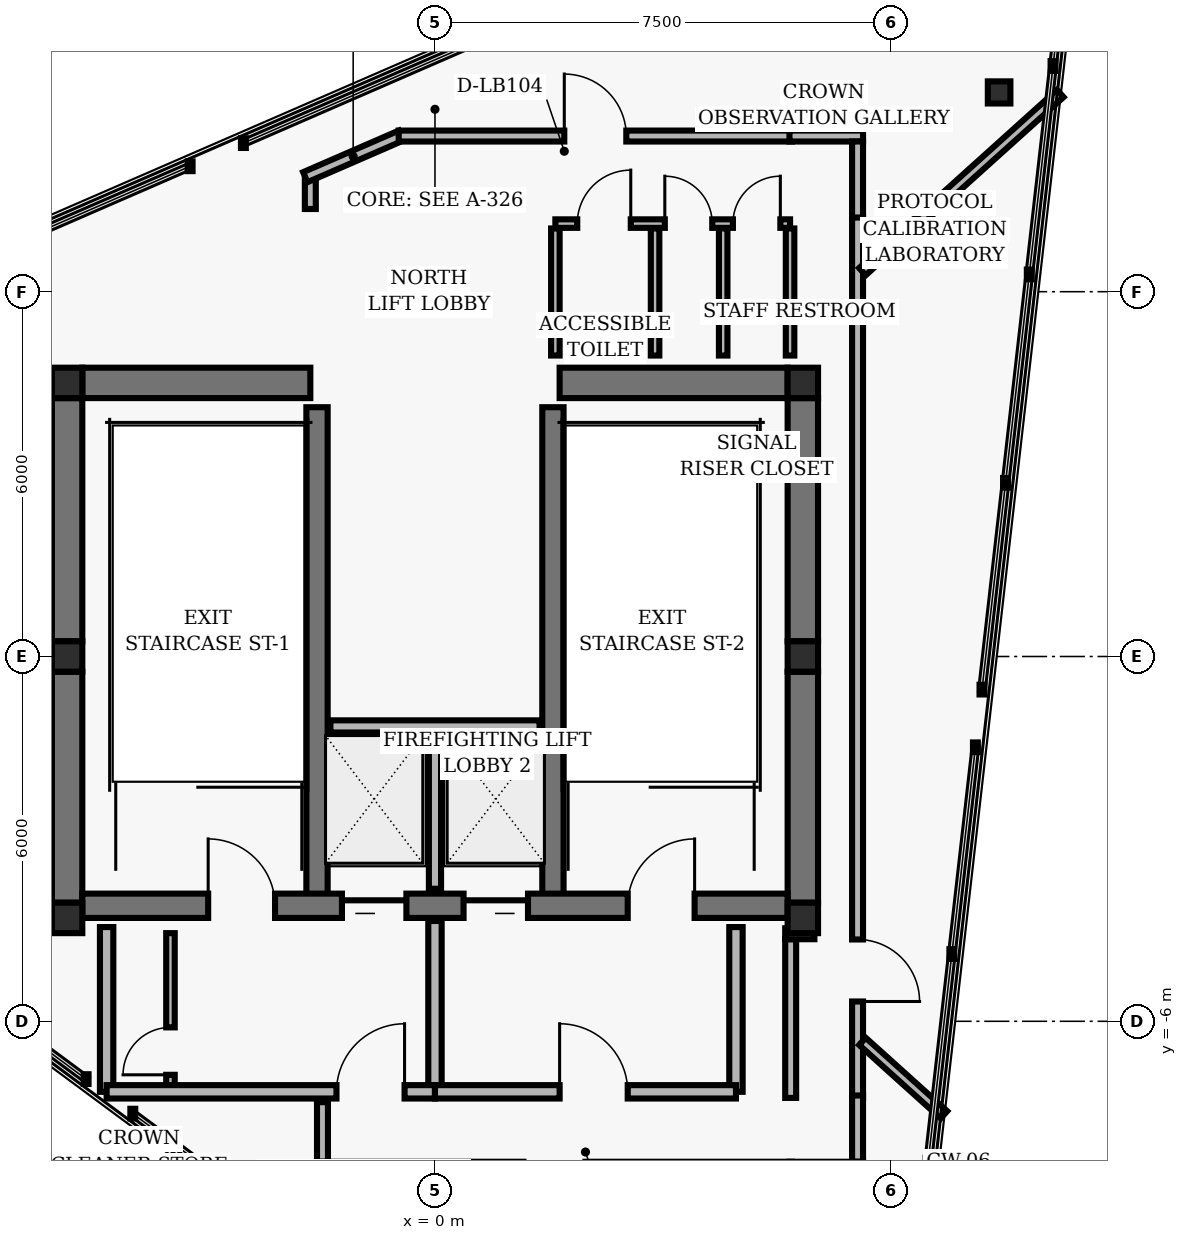
"""IFC4 building model, lengths in metres.
Left out: names, types, materials, properties, quantities, classifications, styles, units other than length and angle.
Written with IfcOpenShell. Run it as: python <this file> out.ifc"""

import sys

from ifc_helpers import new_model, si_unit, direction, frame, frame_2d, origin, origin_2d, place, context, subcontext, project, spatial, rectangle, hollow_rectangle, i_section, extrude, element, fill, save


model = new_model("IFC4")
c1 = context("Model", 3, precision=1e-05, world=origin(), true_north=direction((0.0, 1.0)))
c2 = subcontext(c1, "Body", "Model", "MODEL_VIEW")
j1 = project(units=[si_unit("LENGTHUNIT", "METRE"), si_unit("PLANEANGLEUNIT", "RADIAN")], contexts=[c1])
p1 = place(None, origin())
s1 = spatial("IfcSite", under=j1, at=p1, CompositionType="ELEMENT")
p2 = place(p1, origin())
s2 = spatial("IfcBuilding", under=s1, at=p2, CompositionType="ELEMENT")
p3 = place(p2, frame((0.0, 0.0, 254.88)))
s3 = spatial("IfcBuildingStorey", under=s2, at=p3, CompositionType="ELEMENT", Elevation=254.88)
for number, where, z_axis, x_axis in (
    (1, (-6.05, 4.5, 0.0), (0.0, 0.0, 1.0), (1.0, 0.0, 0.0)),
    (2, (6.05, 4.5, 0.0), (0.0, 0.0, 1.0), (1.0, 0.0, 0.0)),
    (3, (-6.05, 0.0, 0.0), (0.0, 0.0, 1.0), (1.0, 0.0, 0.0)),
    (4, (6.05, 0.0, 0.0), (0.0, 0.0, 1.0), (1.0, 0.0, 0.0)),
    (5, (-6.05, -4.3, 0.0), (0.0, 0.0, 1.0), (1.0, 0.0, 0.0)),
    (6, (6.05, -4.3, 0.0), (0.0, 0.0, 1.0), (1.0, 0.0, 0.0)),
):
    element("IfcColumn", number, at=place(p3, frame(where, z_axis=z_axis, x_axis=x_axis)), inside=s3, PredefinedType="COLUMN", context=c2, shape_type="SweptSolid", body=[
        extrude(hollow_rectangle(XDim=0.5, YDim=0.5, WallThickness=0.02, InnerFilletRadius=0.02, OuterFilletRadius=0.04, at=origin_2d()), origin(), (0.0, 0.0, 1.0), 2.88),
    ])
p4 = place(p3, frame((-6.05, 0.25, 0.0), z_axis=(0.0, 0.0, 1.0), x_axis=(0.0, 1.0, 0.0)))
e7 = element("IfcWall", 7, at=p4, inside=s3, PredefinedType="SHEAR", context=c2, shape_type="SweptSolid", body=[
    extrude(rectangle(XDim=4.0, YDim=0.5, at=frame_2d((2.0, 0.0))), origin(), (0.0, 0.0, 1.0), 2.458),
])
p5 = place(p3, frame((-6.05, -4.05, 0.0), z_axis=(0.0, 0.0, 1.0), x_axis=(0.0, 1.0, 0.0)))
e8 = element("IfcWall", 8, at=p5, inside=s3, PredefinedType="SHEAR", context=c2, shape_type="SweptSolid", body=[
    extrude(rectangle(XDim=3.8, YDim=0.5, at=frame_2d((1.9, 0.0))), origin(), (0.0, 0.0, 1.0), 2.458),
])
p6 = place(p3, frame((6.05, 0.25, 0.0), z_axis=(0.0, 0.0, 1.0), x_axis=(0.0, 1.0, 0.0)))
e9 = element("IfcWall", 9, at=p6, inside=s3, PredefinedType="SHEAR", context=c2, shape_type="SweptSolid", body=[
    extrude(rectangle(XDim=4.0, YDim=0.5, at=frame_2d((2.0, 0.0))), origin(), (0.0, 0.0, 1.0), 2.458),
])
p7 = place(p3, frame((6.05, -4.05, 0.0), z_axis=(0.0, 0.0, 1.0), x_axis=(0.0, 1.0, 0.0)))
e10 = element("IfcWall", 10, at=p7, inside=s3, PredefinedType="SHEAR", context=c2, shape_type="SweptSolid", body=[
    extrude(rectangle(XDim=3.8, YDim=0.5, at=frame_2d((1.9, 0.0))), origin(), (0.0, 0.0, 1.0), 2.458),
])
for number, where, z_axis, x_axis in (
    (11, (-1.94, -4.1, 0.0), (0.0, 0.0, 1.0), (0.0, 1.0, 0.0)),
    (12, (1.94, -4.1, 0.0), (0.0, 0.0, 1.0), (0.0, 1.0, 0.0)),
):
    element("IfcWall", number, at=place(p3, frame(where, z_axis=z_axis, x_axis=x_axis)), inside=s3, PredefinedType="SHEAR", context=c2, shape_type="SweptSolid", body=[
        extrude(rectangle(XDim=8.2, YDim=0.35, at=frame_2d((4.1, 0.0))), origin(), (0.0, 0.0, 1.0), 2.458),
    ])
p8 = place(p3, frame((-5.8, -4.1, 0.0), z_axis=(0.0, 0.0, 1.0), x_axis=(1.0, 0.0, 0.0)))
e13 = element("IfcWall", 13, at=p8, inside=s3, PredefinedType="SHEAR", context=c2, shape_type="SweptSolid", body=[
    extrude(rectangle(XDim=11.6, YDim=0.4, at=frame_2d((5.8, 0.0))), origin(), (0.0, 0.0, 1.0), 2.458),
])
p9 = place(p8, frame((2.07, 0.0, 0.0)))
e14 = element("IfcOpeningElement", 14, at=p9, cuts=e13, PredefinedType="OPENING", context=c2, shape_type="SweptSolid", body=[
    extrude(rectangle(XDim=1.1, YDim=2.04, at=frame_2d((0.55, 1.02))), frame((0.0, 0.21, 0.0), z_axis=(0.0, -1.0, 0.0), x_axis=(1.0, 0.0, 0.0)), (0.0, 0.0, 1.0), 0.42),
])
p10 = place(p8, frame((8.97, 0.0, 0.0)))
e15 = element("IfcOpeningElement", 15, at=p10, cuts=e13, PredefinedType="OPENING", context=c2, shape_type="SweptSolid", body=[
    extrude(rectangle(XDim=1.1, YDim=2.04, at=frame_2d((0.55, 1.02))), frame((0.0, 0.21, 0.0), z_axis=(0.0, -1.0, 0.0), x_axis=(1.0, 0.0, 0.0)), (0.0, 0.0, 1.0), 0.42),
])
p11 = place(p8, frame((4.27, 0.0, 0.0)))
e16 = element("IfcOpeningElement", 16, at=p11, cuts=e13, PredefinedType="OPENING", context=c2, shape_type="SweptSolid", body=[
    extrude(rectangle(XDim=1.06, YDim=2.04, at=frame_2d((0.53, 1.02))), frame((0.0, 0.21, 0.0), z_axis=(0.0, -1.0, 0.0), x_axis=(1.0, 0.0, 0.0)), (0.0, 0.0, 1.0), 0.42),
])
p12 = place(p8, frame((6.27, 0.0, 0.0)))
e17 = element("IfcOpeningElement", 17, at=p12, cuts=e13, PredefinedType="OPENING", context=c2, shape_type="SweptSolid", body=[
    extrude(rectangle(XDim=1.06, YDim=2.04, at=frame_2d((0.53, 1.02))), frame((0.0, 0.21, 0.0), z_axis=(0.0, -1.0, 0.0), x_axis=(1.0, 0.0, 0.0)), (0.0, 0.0, 1.0), 0.42),
])
for number, where, z_axis, x_axis in (
    (18, (-5.8, 4.5, 0.0), (0.0, 0.0, 1.0), (1.0, 0.0, 0.0)),
    (19, (2.05, 4.5, 0.0), (0.0, 0.0, 1.0), (1.0, 0.0, 0.0)),
):
    element("IfcWall", number, at=place(p3, frame(where, z_axis=z_axis, x_axis=x_axis)), inside=s3, PredefinedType="SHEAR", context=c2, shape_type="SweptSolid", body=[
        extrude(rectangle(XDim=3.75, YDim=0.5, at=frame_2d((1.875, 0.0))), origin(), (0.0, 0.0, 1.0), 2.458),
    ])
p13 = place(p3, frame((9.278, 9.277, 0.0), z_axis=(0.0, 0.0, 1.0), x_axis=(1.0, 0.0, 0.0)))
e20 = element("IfcColumn", 20, at=p13, inside=s3, PredefinedType="COLUMN", context=c2, shape_type="SweptSolid", body=[
    extrude(i_section(OverallWidth=0.371, OverallDepth=0.364, WebThickness=0.013, FlangeThickness=0.022, FilletRadius=0.015, at=origin_2d()), origin(), (0.0, 0.0, 1.0), 2.88),
])
p14 = place(p3, frame((0.0, -3.82, 0.0), z_axis=(0.0, 0.0, 1.0), x_axis=(0.0, 1.0, 0.0)))
e21 = element("IfcWall", 21, at=p14, inside=s3, PredefinedType="PARTITIONING", context=c2, shape_type="SweptSolid", body=[
    extrude(rectangle(XDim=2.67, YDim=0.2, at=frame_2d((1.335, 0.0))), origin(), (0.0, 0.0, 1.0), 2.433),
])
p15 = place(p3, frame((-1.72, -1.15, 0.0), z_axis=(0.0, 0.0, 1.0), x_axis=(1.0, 0.0, 0.0)))
e22 = element("IfcWall", 22, at=p15, inside=s3, PredefinedType="PARTITIONING", context=c2, shape_type="SweptSolid", body=[
    extrude(rectangle(XDim=3.44, YDim=0.2, at=frame_2d((1.72, 0.0))), origin(), (0.0, 0.0, 1.0), 2.433),
])
for number, where, z_axis, x_axis in (
    (23, (-5.4, -7.16, 0.0), (0.0, 0.0, 1.0), (0.0, 1.0, 0.0)),
    (24, (4.95, -7.16, 0.0), (0.0, 0.0, 1.0), (0.0, 1.0, 0.0)),
):
    element("IfcWall", number, at=place(p3, frame(where, z_axis=z_axis, x_axis=x_axis)), inside=s3, PredefinedType="PARTITIONING", context=c2, shape_type="SweptSolid", body=[
        extrude(rectangle(XDim=2.71, YDim=0.22, at=frame_2d((1.355, 0.0))), origin(), (0.0, 0.0, 1.0), 2.433),
    ])
p16 = place(p3, frame((0.0, -7.16, 0.0), z_axis=(0.0, 0.0, 1.0), x_axis=(0.0, 1.0, 0.0)))
e25 = element("IfcWall", 25, at=p16, inside=s3, PredefinedType="PARTITIONING", context=c2, shape_type="SweptSolid", body=[
    extrude(rectangle(XDim=2.81, YDim=0.22, at=frame_2d((1.405, 0.0))), origin(), (0.0, 0.0, 1.0), 2.433),
])
p17 = place(p3, frame((-4.35, -7.12, 0.0), z_axis=(0.0, 0.0, 1.0), x_axis=(0.0, 1.0, 0.0)))
e26 = element("IfcWall", 26, at=p17, inside=s3, PredefinedType="PARTITIONING", context=c2, shape_type="SweptSolid", body=[
    extrude(rectangle(XDim=2.57, YDim=0.14, at=frame_2d((1.285, 0.0))), origin(), (0.0, 0.0, 1.0), 2.433),
])
p18 = place(p17, frame((0.24, 0.0, 0.0)))
e27 = element("IfcOpeningElement", 27, at=p18, cuts=e26, PredefinedType="OPENING", context=c2, shape_type="SweptSolid", body=[
    extrude(rectangle(XDim=0.78, YDim=2.01, at=frame_2d((0.39, 1.005))), frame((0.0, 0.08, 0.0), z_axis=(0.0, -1.0, 0.0), x_axis=(1.0, 0.0, 0.0)), (0.0, 0.0, 1.0), 0.16),
])
p19 = place(p3, frame((-5.4, -7.16, 0.0), z_axis=(0.0, 0.0, 1.0), x_axis=(1.0, 0.0, 0.0)))
e28 = element("IfcWall", 28, at=p19, inside=s3, PredefinedType="PARTITIONING", context=c2, shape_type="SweptSolid", body=[
    extrude(rectangle(XDim=5.4, YDim=0.22, at=frame_2d((2.7, 0.0))), origin(), (0.0, 0.0, 1.0), 2.433),
])
p20 = place(p19, frame((3.78, 0.0, 0.0)))
e29 = element("IfcOpeningElement", 29, at=p20, cuts=e28, PredefinedType="OPENING", context=c2, shape_type="SweptSolid", body=[
    extrude(rectangle(XDim=1.12, YDim=2.02, at=frame_2d((0.56, 1.01))), frame((0.0, 0.12, 0.0), z_axis=(0.0, -1.0, 0.0), x_axis=(1.0, 0.0, 0.0)), (0.0, 0.0, 1.0), 0.24),
])
p21 = place(p3, frame((0.0, -7.16, 0.0), z_axis=(0.0, 0.0, 1.0), x_axis=(1.0, 0.0, 0.0)))
e30 = element("IfcWall", 30, at=p21, inside=s3, PredefinedType="PARTITIONING", context=c2, shape_type="SweptSolid", body=[
    extrude(rectangle(XDim=4.95, YDim=0.22, at=frame_2d((2.475, 0.0))), origin(), (0.0, 0.0, 1.0), 2.433),
])
p22 = place(p21, frame((2.05, 0.0, 0.0)))
e31 = element("IfcOpeningElement", 31, at=p22, cuts=e30, PredefinedType="OPENING", context=c2, shape_type="SweptSolid", body=[
    extrude(rectangle(XDim=1.12, YDim=2.02, at=frame_2d((0.56, 1.01))), frame((0.0, 0.12, 0.0), z_axis=(0.0, -1.0, 0.0), x_axis=(1.0, 0.0, 0.0)), (0.0, 0.0, 1.0), 0.24),
])
p23 = place(p3, frame((1.98, 4.95, 0.0), z_axis=(0.0, 0.0, 1.0), x_axis=(0.0, 1.0, 0.0)))
e32 = element("IfcWall", 32, at=p23, inside=s3, PredefinedType="PARTITIONING", context=c2, shape_type="SweptSolid", body=[
    extrude(rectangle(XDim=2.09, YDim=0.14, at=frame_2d((1.045, 0.0))), origin(), (0.0, 0.0, 1.0), 2.433),
])
p24 = place(p3, frame((5.84, 4.95, 0.0), z_axis=(0.0, 0.0, 1.0), x_axis=(0.0, 1.0, 0.0)))
e33 = element("IfcWall", 33, at=p24, inside=s3, PredefinedType="PARTITIONING", context=c2, shape_type="SweptSolid", body=[
    extrude(rectangle(XDim=2.09, YDim=0.14, at=frame_2d((1.045, 0.0))), origin(), (0.0, 0.0, 1.0), 1.963),
])
p25 = place(p3, frame((1.98, 7.12, 0.0), z_axis=(0.0, 0.0, 1.0), x_axis=(1.0, 0.0, 0.0)))
e34 = element("IfcWall", 34, at=p25, inside=s3, PredefinedType="PARTITIONING", context=c2, shape_type="SweptSolid", body=[
    extrude(rectangle(XDim=3.86, YDim=0.14, at=frame_2d((1.93, 0.0))), origin(), (0.0, 0.0, 1.0), 2.433),
])
p26 = place(p25, frame((0.36, 0.0, 0.0)))
e35 = element("IfcOpeningElement", 35, at=p26, cuts=e34, PredefinedType="OPENING", context=c2, shape_type="SweptSolid", body=[
    extrude(rectangle(XDim=0.88, YDim=2.02, at=frame_2d((0.44, 1.01))), frame((0.0, 0.08, 0.0), z_axis=(0.0, -1.0, 0.0), x_axis=(1.0, 0.0, 0.0)), (0.0, 0.0, 1.0), 0.16),
])
p27 = place(p25, frame((1.8, 0.0, 0.0)))
e36 = element("IfcOpeningElement", 36, at=p27, cuts=e34, PredefinedType="OPENING", context=c2, shape_type="SweptSolid", body=[
    extrude(rectangle(XDim=0.78, YDim=2.01, at=frame_2d((0.39, 1.005))), frame((0.0, 0.08, 0.0), z_axis=(0.0, -1.0, 0.0), x_axis=(1.0, 0.0, 0.0)), (0.0, 0.0, 1.0), 0.16),
])
p28 = place(p25, frame((2.92, 0.0, 0.0)))
e37 = element("IfcOpeningElement", 37, at=p28, cuts=e34, PredefinedType="OPENING", context=c2, shape_type="SweptSolid", body=[
    extrude(rectangle(XDim=0.78, YDim=2.01, at=frame_2d((0.39, 1.005))), frame((0.0, 0.08, 0.0), z_axis=(0.0, -1.0, 0.0), x_axis=(1.0, 0.0, 0.0)), (0.0, 0.0, 1.0), 0.16),
])
for number, where, z_axis, x_axis in (
    (38, (3.62, 4.95, 0.0), (0.0, 0.0, 1.0), (0.0, 1.0, 0.0)),
    (39, (4.74, 4.95, 0.0), (0.0, 0.0, 1.0), (0.0, 1.0, 0.0)),
):
    element("IfcWall", number, at=place(p3, frame(where, z_axis=z_axis, x_axis=x_axis)), inside=s3, PredefinedType="PARTITIONING", context=c2, shape_type="SweptSolid", body=[
        extrude(rectangle(XDim=2.09, YDim=0.14, at=frame_2d((1.045, 0.0))), origin(), (0.0, 0.0, 1.0), 2.433),
    ])
p29 = place(p3, frame((-1.85, -8.31, 0.0), z_axis=(0.0, 0.0, 1.0), x_axis=(0.0, 1.0, 0.0)))
e40 = element("IfcWall", 40, at=p29, inside=s3, PredefinedType="PARTITIONING", context=c2, shape_type="SweptSolid", body=[
    extrude(rectangle(XDim=0.98, YDim=0.18, at=frame_2d((0.49, 0.0))), origin(), (0.0, 0.0, 1.0), 2.433),
])
p30 = place(p3, frame((5.85, -7.26, 0.0), z_axis=(0.0, 0.0, 1.0), x_axis=(0.0, 1.0, 0.0)))
e41 = element("IfcWall", 41, at=p30, inside=s3, PredefinedType="PARTITIONING", context=c2, shape_type="SweptSolid", body=[
    extrude(rectangle(XDim=2.61, YDim=0.18, at=frame_2d((1.305, 0.0))), origin(), (0.0, 0.0, 1.0), 1.963),
])
p31 = place(p3, frame((5.76, -4.56, 0.0), z_axis=(0.0, 0.0, 1.0), x_axis=(1.0, 0.0, 0.0)))
e42 = element("IfcWall", 42, at=p31, inside=s3, PredefinedType="PARTITIONING", context=c2, shape_type="SweptSolid", body=[
    extrude(rectangle(XDim=0.48, YDim=0.18, at=frame_2d((0.24, 0.0))), origin(), (0.0, 0.0, 1.0), 2.433),
])
p32 = place(p3, frame((-2.05, 7.36, 0.0), z_axis=(0.0, 0.0, 1.0), x_axis=(0.0, 1.0, 0.0)))
e43 = element("IfcWall", 43, at=p32, inside=s3, PredefinedType="PARTITIONING", context=c2, shape_type="SweptSolid", body=[
    extrude(rectangle(XDim=0.489, YDim=0.18, at=frame_2d((0.245, 0.0))), origin(), (0.0, 0.0, 1.0), 2.433),
])
p33 = place(p3, frame((-2.133, 7.883, 0.0), z_axis=(0.0, 0.0, 1.0), x_axis=(0.91701353087, 0.398856094602, 0.0)))
e44 = element("IfcWall", 44, at=p33, inside=s3, PredefinedType="PARTITIONING", context=c2, shape_type="SweptSolid", body=[
    extrude(rectangle(XDim=1.717, YDim=0.18, at=frame_2d((0.858, 0.0))), origin(), (0.0, 0.0, 1.0), 2.013),
])
p34 = place(p3, frame((-0.596, 8.56, 0.0), z_axis=(0.0, 0.0, 1.0), x_axis=(1.0, 0.0, 0.0)))
e45 = element("IfcWall", 45, at=p34, inside=s3, PredefinedType="PARTITIONING", context=c2, shape_type="SweptSolid", body=[
    extrude(rectangle(XDim=6.467, YDim=0.18, at=frame_2d((3.233, 0.0))), origin(), (0.0, 0.0, 1.0), 2.433),
])
p35 = place(p34, frame((2.723, 0.0, 0.0)))
e46 = element("IfcOpeningElement", 46, at=p35, cuts=e45, PredefinedType="OPENING", context=c2, shape_type="SweptSolid", body=[
    extrude(rectangle(XDim=1.02, YDim=2.02, at=frame_2d((0.51, 1.01))), frame((0.0, 0.1, 0.0), z_axis=(0.0, -1.0, 0.0), x_axis=(1.0, 0.0, 0.0)), (0.0, 0.0, 1.0), 0.2),
])
p36 = place(p3, frame((5.83, 8.56, 0.0), z_axis=(0.0, 0.0, 1.0), x_axis=(1.0, 0.0, 0.0)))
e47 = element("IfcWall", 47, at=p36, inside=s3, PredefinedType="PARTITIONING", context=c2, shape_type="SweptSolid", body=[
    extrude(rectangle(XDim=1.21, YDim=0.18, at=frame_2d((0.605, 0.0))), origin(), (0.0, 0.0, 1.0), 2.433),
])
p37 = place(p3, frame((6.95, 8.47, 0.0), z_axis=(0.0, 0.0, 1.0), x_axis=(0.0, -1.0, 0.0)))
e48 = element("IfcWall", 48, at=p37, inside=s3, PredefinedType="PARTITIONING", context=c2, shape_type="SweptSolid", body=[
    extrude(rectangle(XDim=1.29, YDim=0.18, at=frame_2d((0.645, 0.0))), origin(), (0.0, 0.0, 1.0), 2.433),
])
p38 = place(p3, frame((6.95, 7.22, 0.0), z_axis=(0.0, 0.0, 1.0), x_axis=(0.0, -1.0, 0.0)))
e49 = element("IfcWall", 49, at=p38, inside=s3, PredefinedType="PARTITIONING", context=c2, shape_type="SweptSolid", body=[
    extrude(rectangle(XDim=14.48, YDim=0.18, at=frame_2d((7.24, 0.0))), origin(), (0.0, 0.0, 1.0), 2.433),
])
p39 = place(p38, frame((11.874, 0.0, 0.0)))
e50 = element("IfcOpeningElement", 50, at=p39, cuts=e49, PredefinedType="OPENING", context=c2, shape_type="SweptSolid", body=[
    extrude(rectangle(XDim=1.02, YDim=2.02, at=frame_2d((0.51, 1.01))), frame((0.0, 0.1, 0.0), z_axis=(0.0, -1.0, 0.0), x_axis=(1.0, 0.0, 0.0)), (0.0, 0.0, 1.0), 0.2),
])
p40 = place(p3, frame((6.95, -7.22, 0.0), z_axis=(0.0, 0.0, 1.0), x_axis=(0.0, -1.0, 0.0)))
e51 = element("IfcWall", 51, at=p40, inside=s3, PredefinedType="PARTITIONING", context=c2, shape_type="SweptSolid", body=[
    extrude(rectangle(XDim=1.09, YDim=0.18, at=frame_2d((0.545, 0.0))), origin(), (0.0, 0.0, 1.0), 1.963),
])
p41 = place(p3, frame((7.03, -6.33, 0.0), z_axis=(0.0, 0.0, 1.0), x_axis=(0.743152807618, -0.669121741188, 0.0)))
e52 = element("IfcWall", 52, at=p41, inside=s3, PredefinedType="PARTITIONING", context=c2, shape_type="SweptSolid", body=[
    extrude(rectangle(XDim=1.804, YDim=0.16, at=frame_2d((0.902, 0.0))), origin(), (0.0, 0.0, 1.0), 2.433),
])
p42 = place(p3, frame((7.03, 6.33, 0.0), z_axis=(0.0, 0.0, 1.0), x_axis=(0.74313056162, 0.669146447638, 0.0)))
e53 = element("IfcWall", 53, at=p42, inside=s3, PredefinedType="PARTITIONING", context=c2, shape_type="SweptSolid", body=[
    extrude(rectangle(XDim=4.379, YDim=0.16, at=frame_2d((2.189, 0.0))), origin(), (0.0, 0.0, 1.0), 1.963),
])
p43 = place(p9, origin())
e54 = element("IfcDoor", 54, at=p43, inside=s3, OperationType="SINGLE_SWING_LEFT", PredefinedType="DOOR", context=c2, shape_type="SweptSolid", body=[
    extrude(rectangle(XDim=1.1, YDim=2.04, at=frame_2d((0.55, 1.02))), frame((0.0, 0.025, 0.0), z_axis=(0.0, -1.0, 0.0), x_axis=(1.0, 0.0, 0.0)), (0.0, 0.0, 1.0), 0.05),
])
fill(e14, e54)
p44 = place(p10, origin())
e55 = element("IfcDoor", 55, at=p44, inside=s3, OperationType="SINGLE_SWING_RIGHT", PredefinedType="DOOR", context=c2, shape_type="SweptSolid", body=[
    extrude(rectangle(XDim=1.1, YDim=2.04, at=frame_2d((0.55, 1.02))), frame((0.0, 0.025, 0.0), z_axis=(0.0, -1.0, 0.0), x_axis=(1.0, 0.0, 0.0)), (0.0, 0.0, 1.0), 0.05),
])
fill(e15, e55)
p45 = place(p11, origin())
e56 = element("IfcDoor", 56, at=p45, inside=s3, OperationType="SLIDING_TO_LEFT", PredefinedType="DOOR", context=c2, shape_type="SweptSolid", body=[
    extrude(rectangle(XDim=1.06, YDim=2.04, at=frame_2d((0.53, 1.02))), frame((0.0, 0.025, 0.0), z_axis=(0.0, -1.0, 0.0), x_axis=(1.0, 0.0, 0.0)), (0.0, 0.0, 1.0), 0.05),
])
fill(e16, e56)
p46 = place(p12, origin())
e57 = element("IfcDoor", 57, at=p46, inside=s3, OperationType="SLIDING_TO_RIGHT", PredefinedType="DOOR", context=c2, shape_type="SweptSolid", body=[
    extrude(rectangle(XDim=1.06, YDim=2.04, at=frame_2d((0.53, 1.02))), frame((0.0, 0.025, 0.0), z_axis=(0.0, -1.0, 0.0), x_axis=(1.0, 0.0, 0.0)), (0.0, 0.0, 1.0), 0.05),
])
fill(e17, e57)
p47 = place(p18, origin())
e58 = element("IfcDoor", 58, at=p47, inside=s3, OperationType="SINGLE_SWING_LEFT", PredefinedType="DOOR", context=c2, shape_type="SweptSolid", body=[
    extrude(rectangle(XDim=0.78, YDim=2.01, at=frame_2d((0.39, 1.005))), frame((0.0, 0.025, 0.0), z_axis=(0.0, -1.0, 0.0), x_axis=(1.0, 0.0, 0.0)), (0.0, 0.0, 1.0), 0.05),
])
fill(e27, e58)
p48 = place(p20, origin())
e59 = element("IfcDoor", 59, at=p48, inside=s3, OperationType="SINGLE_SWING_RIGHT", PredefinedType="DOOR", context=c2, shape_type="SweptSolid", body=[
    extrude(rectangle(XDim=1.12, YDim=2.02, at=frame_2d((0.56, 1.01))), frame((0.0, 0.025, 0.0), z_axis=(0.0, -1.0, 0.0), x_axis=(1.0, 0.0, 0.0)), (0.0, 0.0, 1.0), 0.05),
])
fill(e29, e59)
p49 = place(p22, origin())
e60 = element("IfcDoor", 60, at=p49, inside=s3, OperationType="SINGLE_SWING_LEFT", PredefinedType="DOOR", context=c2, shape_type="SweptSolid", body=[
    extrude(rectangle(XDim=1.12, YDim=2.02, at=frame_2d((0.56, 1.01))), frame((0.0, 0.025, 0.0), z_axis=(0.0, -1.0, 0.0), x_axis=(1.0, 0.0, 0.0)), (0.0, 0.0, 1.0), 0.05),
])
fill(e31, e60)
p50 = place(p26, origin())
e61 = element("IfcDoor", 61, at=p50, inside=s3, OperationType="SINGLE_SWING_RIGHT", PredefinedType="DOOR", context=c2, shape_type="SweptSolid", body=[
    extrude(rectangle(XDim=0.88, YDim=2.02, at=frame_2d((0.44, 1.01))), frame((0.0, 0.025, 0.0), z_axis=(0.0, -1.0, 0.0), x_axis=(1.0, 0.0, 0.0)), (0.0, 0.0, 1.0), 0.05),
])
fill(e35, e61)
p51 = place(p27, origin())
e62 = element("IfcDoor", 62, at=p51, inside=s3, OperationType="SINGLE_SWING_LEFT", PredefinedType="DOOR", context=c2, shape_type="SweptSolid", body=[
    extrude(rectangle(XDim=0.78, YDim=2.01, at=frame_2d((0.39, 1.005))), frame((0.0, 0.025, 0.0), z_axis=(0.0, -1.0, 0.0), x_axis=(1.0, 0.0, 0.0)), (0.0, 0.0, 1.0), 0.05),
])
fill(e36, e62)
p52 = place(p28, origin())
e63 = element("IfcDoor", 63, at=p52, inside=s3, OperationType="SINGLE_SWING_RIGHT", PredefinedType="DOOR", context=c2, shape_type="SweptSolid", body=[
    extrude(rectangle(XDim=0.78, YDim=2.01, at=frame_2d((0.39, 1.005))), frame((0.0, 0.025, 0.0), z_axis=(0.0, -1.0, 0.0), x_axis=(1.0, 0.0, 0.0)), (0.0, 0.0, 1.0), 0.05),
])
fill(e37, e63)
p53 = place(p39, origin())
e64 = element("IfcDoor", 64, at=p53, inside=s3, OperationType="SINGLE_SWING_RIGHT", PredefinedType="DOOR", context=c2, shape_type="SweptSolid", body=[
    extrude(rectangle(XDim=1.02, YDim=2.02, at=frame_2d((0.51, 1.01))), frame((0.0, 0.025, 0.0), z_axis=(0.0, -1.0, 0.0), x_axis=(1.0, 0.0, 0.0)), (0.0, 0.0, 1.0), 0.05),
])
fill(e50, e64)
p54 = place(p35, origin())
e65 = element("IfcDoor", 65, at=p54, inside=s3, OperationType="SINGLE_SWING_LEFT", PredefinedType="DOOR", context=c2, shape_type="SweptSolid", body=[
    extrude(rectangle(XDim=1.02, YDim=2.02, at=frame_2d((0.51, 1.01))), frame((0.0, 0.025, 0.0), z_axis=(0.0, -1.0, 0.0), x_axis=(1.0, 0.0, 0.0)), (0.0, 0.0, 1.0), 0.05),
])
fill(e46, e65)
save(model, sys.argv[1])
